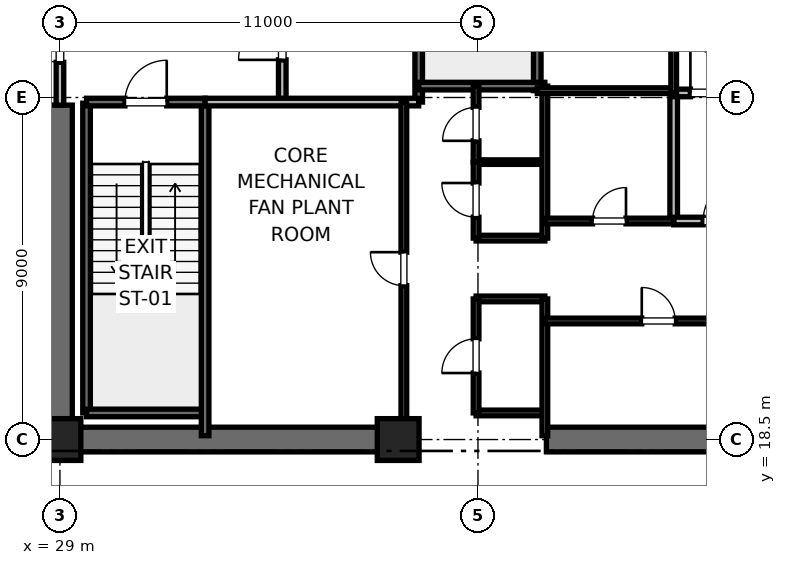
"""IFC4 building model, lengths in metres.
Left out: names, types, materials, properties, quantities, classifications, styles, units other than length and angle.
Written with IfcOpenShell. Run it as: python <this file> out.ifc"""

import sys

from ifc_helpers import new_model, si_unit, direction, frame, frame_2d, origin, origin_2d, place, context, subcontext, project, spatial, rectangle, extrude, element, fill, save


model = new_model("IFC4")
c1 = context("Model", 3, precision=1e-05, world=origin(), true_north=direction((0.0, 1.0)))
c2 = subcontext(c1, "Body", "Model", "MODEL_VIEW")
j1 = project(units=[si_unit("LENGTHUNIT", "METRE"), si_unit("PLANEANGLEUNIT", "RADIAN")], contexts=[c1])
p1 = place(None, origin())
s1 = spatial("IfcSite", under=j1, at=p1, CompositionType="ELEMENT")
p2 = place(p1, origin())
s2 = spatial("IfcBuilding", under=s1, at=p2, CompositionType="ELEMENT")
p3 = place(p2, frame((0.0, 0.0, -9.0)))
s3 = spatial("IfcBuildingStorey", under=s2, at=p3, CompositionType="ELEMENT", Elevation=-9.0)
for number, where, z_axis, x_axis in (
    (1, (29.0, 18.5, -0.3), (0.0, 0.0, 1.0), (1.0, 0.0, 0.0)),
    (2, (37.9, 18.5, -0.3), (0.0, 0.0, 1.0), (1.0, 0.0, 0.0)),
):
    element("IfcColumn", number, at=place(p3, frame(where, z_axis=z_axis, x_axis=x_axis)), inside=s3, PredefinedType="PILASTER", context=c2, shape_type="SweptSolid", body=[
        extrude(rectangle(XDim=1.1, YDim=1.1, at=origin_2d()), origin(), (0.0, 0.0, 1.0), 4.8),
    ])
for number, where, z_axis, x_axis in (
    (3, (29.0, 18.5, -0.3), (0.0, 0.0, 1.0), (1.0, 0.0, 0.0)),
    (4, (41.8, 18.5, -0.3), (0.0, 0.0, 1.0), (1.0, 0.0, 0.0)),
):
    element("IfcWall", number, at=place(p3, frame(where, z_axis=z_axis, x_axis=x_axis)), inside=s3, PredefinedType="SHEAR", context=c2, shape_type="SweptSolid", body=[
        extrude(rectangle(XDim=9.2, YDim=0.65, at=frame_2d((4.6, 0.0))), origin(), (0.0, 0.0, 1.0), 4.5),
    ])
p4 = place(p3, frame((29.0, 18.5, -0.3), z_axis=(0.0, 0.0, 1.0), x_axis=(0.0, 1.0, 0.0)))
e5 = element("IfcWall", 5, at=p4, inside=s3, PredefinedType="SHEAR", context=c2, shape_type="SweptSolid", body=[
    extrude(rectangle(XDim=8.8, YDim=0.65, at=frame_2d((4.4, 0.0))), origin(), (0.0, 0.0, 1.0), 4.5),
])
p5 = place(p3, frame((29.7, 19.2, -0.3), z_axis=(0.0, 0.0, 1.0), x_axis=(0.0, 1.0, 0.0)))
e6 = element("IfcWall", 6, at=p5, inside=s3, PredefinedType="SOLIDWALL", context=c2, shape_type="SweptSolid", body=[
    extrude(rectangle(XDim=8.15, YDim=0.2, at=frame_2d((4.075, 0.0))), origin(), (0.0, 0.0, 1.0), 4.5),
])
p6 = place(p3, frame((29.7, 19.2, -0.3), z_axis=(0.0, 0.0, 1.0), x_axis=(1.0, 0.0, 0.0)))
e7 = element("IfcWall", 7, at=p6, inside=s3, PredefinedType="SOLIDWALL", context=c2, shape_type="SweptSolid", body=[
    extrude(rectangle(XDim=3.12, YDim=0.2, at=frame_2d((1.56, 0.0))), origin(), (0.0, 0.0, 1.0), 4.5),
])
p7 = place(p3, frame((32.82, 18.6, -0.3), z_axis=(0.0, 0.0, 1.0), x_axis=(0.0, 1.0, 0.0)))
e8 = element("IfcWall", 8, at=p7, inside=s3, PredefinedType="SOLIDWALL", context=c2, shape_type="SweptSolid", body=[
    extrude(rectangle(XDim=8.78, YDim=0.2, at=frame_2d((4.39, 0.0))), origin(), (0.0, 0.0, 1.0), 4.5),
])
p8 = place(p3, frame((29.7, 27.38, -0.3), z_axis=(0.0, 0.0, 1.0), x_axis=(1.0, 0.0, 0.0)))
e9 = element("IfcWall", 9, at=p8, inside=s3, PredefinedType="SOLIDWALL", context=c2, shape_type="SweptSolid", body=[
    extrude(rectangle(XDim=3.12, YDim=0.2, at=frame_2d((1.56, 0.0))), origin(), (0.0, 0.0, 1.0), 4.5),
])
p9 = place(p8, frame((1.01, 0.0, 0.3)))
e10 = element("IfcOpeningElement", 10, at=p9, cuts=e9, PredefinedType="OPENING", context=c2, shape_type="SweptSolid", body=[
    extrude(rectangle(XDim=1.1, YDim=2.15, at=frame_2d((0.55, 1.075))), frame((0.0, 0.1, 0.0), z_axis=(0.0, -1.0, 0.0), x_axis=(1.0, 0.0, 0.0)), (0.0, 0.0, 1.0), 0.2),
])
p10 = place(p3, frame((38.44, 27.38, -0.3), z_axis=(0.0, 0.0, 1.0), x_axis=(0.0, 1.0, 0.0)))
e11 = element("IfcWall", 11, at=p10, inside=s3, PredefinedType="SOLIDWALL", context=c2, shape_type="SweptSolid", body=[
    extrude(rectangle(XDim=8.87, YDim=0.2, at=frame_2d((4.435, 0.0))), origin(), (0.0, 0.0, 1.0), 4.5),
])
p11 = place(p3, frame((41.56, 27.68, -0.3), z_axis=(0.0, 0.0, 1.0), x_axis=(0.0, 1.0, 0.0)))
e12 = element("IfcWall", 12, at=p11, inside=s3, PredefinedType="SOLIDWALL", context=c2, shape_type="SweptSolid", body=[
    extrude(rectangle(XDim=8.57, YDim=0.2, at=frame_2d((4.285, 0.0))), origin(), (0.0, 0.0, 1.0), 4.5),
])
p12 = place(p3, frame((38.44, 27.8, -0.3), z_axis=(0.0, 0.0, 1.0), x_axis=(1.0, 0.0, 0.0)))
e13 = element("IfcWall", 13, at=p12, inside=s3, PredefinedType="SOLIDWALL", context=c2, shape_type="SweptSolid", body=[
    extrude(rectangle(XDim=3.32, YDim=0.2, at=frame_2d((1.66, 0.0))), origin(), (0.0, 0.0, 1.0), 4.5),
])
p13 = place(p3, frame((34.85, 27.38, 0.0), z_axis=(0.0, 0.0, 1.0), x_axis=(0.0, 1.0, 0.0)))
e14 = element("IfcWall", 14, at=p13, inside=s3, PredefinedType="PARTITIONING", context=c2, shape_type="SweptSolid", body=[
    extrude(rectangle(XDim=3.37, YDim=0.2, at=frame_2d((1.685, 0.0))), origin(), (0.0, 0.0, 1.0), 4.2),
])
p14 = place(p13, frame((1.11, 0.0, 0.0)))
e15 = element("IfcOpeningElement", 15, at=p14, cuts=e14, PredefinedType="OPENING", context=c2, shape_type="SweptSolid", body=[
    extrude(rectangle(XDim=1.15, YDim=2.2, at=frame_2d((0.575, 1.1))), frame((0.0, 0.1, 0.0), z_axis=(0.0, -1.0, 0.0), x_axis=(1.0, 0.0, 0.0)), (0.0, 0.0, 1.0), 0.2),
])
p15 = place(p3, frame((29.0, 27.3, 0.0), z_axis=(0.0, 0.0, 1.0), x_axis=(0.0, 1.0, 0.0)))
e16 = element("IfcWall", 16, at=p15, inside=s3, PredefinedType="PARTITIONING", context=c2, shape_type="SweptSolid", body=[
    extrude(rectangle(XDim=3.4, YDim=0.2, at=frame_2d((1.7, 0.0))), origin(), (0.0, 0.0, 1.0), 2.98),
])
p16 = place(p15, frame((1.125, 0.0, 0.0)))
e17 = element("IfcOpeningElement", 17, at=p16, cuts=e16, PredefinedType="OPENING", context=c2, shape_type="SweptSolid", body=[
    extrude(rectangle(XDim=1.15, YDim=2.2, at=frame_2d((0.575, 1.1))), frame((0.0, 0.1, 0.0), z_axis=(0.0, -1.0, 0.0), x_axis=(1.0, 0.0, 0.0)), (0.0, 0.0, 1.0), 0.2),
])
p17 = place(p3, frame((32.82, 27.38, 0.0), z_axis=(0.0, 0.0, 1.0), x_axis=(1.0, 0.0, 0.0)))
e18 = element("IfcWall", 18, at=p17, inside=s3, PredefinedType="PARTITIONING", context=c2, shape_type="SweptSolid", body=[
    extrude(rectangle(XDim=5.62, YDim=0.2, at=frame_2d((2.81, 0.0))), origin(), (0.0, 0.0, 1.0), 4.2),
])
p18 = place(p3, frame((45.15, 24.25, 0.0), z_axis=(0.0, 0.0, 1.0), x_axis=(0.0, 1.0, 0.0)))
e19 = element("IfcWall", 19, at=p18, inside=s3, PredefinedType="PARTITIONING", context=c2, shape_type="SweptSolid", body=[
    extrude(rectangle(XDim=3.37, YDim=0.2, at=frame_2d((1.685, 0.0))), origin(), (0.0, 0.0, 1.0), 4.2),
])
p19 = place(p3, frame((45.15, 24.25, 0.0), z_axis=(0.0, 0.0, 1.0), x_axis=(1.0, 0.0, 0.0)))
e20 = element("IfcWall", 20, at=p19, inside=s3, PredefinedType="PARTITIONING", context=c2, shape_type="SweptSolid", body=[
    extrude(rectangle(XDim=2.7, YDim=0.2, at=frame_2d((1.35, 0.0))), origin(), (0.0, 0.0, 1.0), 4.2),
])
p20 = place(p19, frame((0.775, 0.0, 0.0)))
e21 = element("IfcOpeningElement", 21, at=p20, cuts=e20, PredefinedType="OPENING", context=c2, shape_type="SweptSolid", body=[
    extrude(rectangle(XDim=1.15, YDim=2.2, at=frame_2d((0.575, 1.1))), frame((0.0, 0.1, 0.0), z_axis=(0.0, -1.0, 0.0), x_axis=(1.0, 0.0, 0.0)), (0.0, 0.0, 1.0), 0.2),
])
p21 = place(p3, frame((45.15, 27.62, 0.0), z_axis=(0.0, 0.0, 1.0), x_axis=(1.0, 0.0, 0.0)))
e22 = element("IfcWall", 22, at=p21, inside=s3, PredefinedType="PARTITIONING", context=c2, shape_type="SweptSolid", body=[
    extrude(rectangle(XDim=2.03, YDim=0.2, at=frame_2d((1.015, 0.0))), origin(), (0.0, 0.0, 1.0), 4.2),
])
p22 = place(p21, frame((0.44, 0.0, 0.0)))
e23 = element("IfcOpeningElement", 23, at=p22, cuts=e22, PredefinedType="OPENING", context=c2, shape_type="SweptSolid", body=[
    extrude(rectangle(XDim=1.15, YDim=2.2, at=frame_2d((0.575, 1.1))), frame((0.0, 0.1, 0.0), z_axis=(0.0, -1.0, 0.0), x_axis=(1.0, 0.0, 0.0)), (0.0, 0.0, 1.0), 0.2),
])
for number, where, z_axis, x_axis in (
    (24, (39.95, 19.2, 0.0), (0.0, 0.0, 1.0), (1.0, 0.0, 0.0)),
    (25, (39.95, 22.2, 0.0), (0.0, 0.0, 1.0), (1.0, 0.0, 0.0)),
    (26, (39.95, 23.8, 0.0), (0.0, 0.0, 1.0), (1.0, 0.0, 0.0)),
):
    element("IfcWall", number, at=place(p3, frame(where, z_axis=z_axis, x_axis=x_axis)), inside=s3, PredefinedType="PARTITIONING", context=c2, shape_type="SweptSolid", body=[
        extrude(rectangle(XDim=1.81, YDim=0.15, at=frame_2d((0.905, 0.0))), origin(), (0.0, 0.0, 1.0), 2.85),
    ])
p23 = place(p3, frame((39.95, 25.8, 0.0), z_axis=(0.0, 0.0, 1.0), x_axis=(1.0, 0.0, 0.0)))
e27 = element("IfcWall", 27, at=p23, inside=s3, PredefinedType="PARTITIONING", context=c2, shape_type="SweptSolid", body=[
    extrude(rectangle(XDim=1.81, YDim=0.12, at=frame_2d((0.905, 0.0))), origin(), (0.0, 0.0, 1.0), 2.85),
])
p24 = place(p3, frame((41.76, 18.6, 0.0), z_axis=(0.0, 0.0, 1.0), x_axis=(0.0, 1.0, 0.0)))
e28 = element("IfcWall", 28, at=p24, inside=s3, PredefinedType="PARTITIONING", context=c2, shape_type="SweptSolid", body=[
    extrude(rectangle(XDim=3.6, YDim=0.15, at=frame_2d((1.8, 0.0))), origin(), (0.0, 0.0, 1.0), 2.85),
])
p25 = place(p3, frame((41.76, 23.8, 0.0), z_axis=(0.0, 0.0, 1.0), x_axis=(0.0, 1.0, 0.0)))
e29 = element("IfcWall", 29, at=p25, inside=s3, PredefinedType="PARTITIONING", context=c2, shape_type="SweptSolid", body=[
    extrude(rectangle(XDim=4.0, YDim=0.15, at=frame_2d((2.0, 0.0))), origin(), (0.0, 0.0, 1.0), 2.85),
])
p26 = place(p3, frame((39.95, 19.2, 0.0), z_axis=(0.0, 0.0, 1.0), x_axis=(0.0, 1.0, 0.0)))
e30 = element("IfcWall", 30, at=p26, inside=s3, PredefinedType="PARTITIONING", context=c2, shape_type="SweptSolid", body=[
    extrude(rectangle(XDim=3.0, YDim=0.15, at=frame_2d((1.5, 0.0))), origin(), (0.0, 0.0, 1.0), 2.85),
])
p27 = place(p26, frame((1.05, 0.0, 0.0)))
e31 = element("IfcOpeningElement", 31, at=p27, cuts=e30, PredefinedType="OPENING", context=c2, shape_type="SweptSolid", body=[
    extrude(rectangle(XDim=0.9, YDim=2.1, at=frame_2d((0.45, 1.05))), frame((0.0, 0.075, 0.0), z_axis=(0.0, -1.0, 0.0), x_axis=(1.0, 0.0, 0.0)), (0.0, 0.0, 1.0), 0.15),
])
p28 = place(p3, frame((39.95, 23.8, 0.0), z_axis=(0.0, 0.0, 1.0), x_axis=(0.0, 1.0, 0.0)))
e32 = element("IfcWall", 32, at=p28, inside=s3, PredefinedType="PARTITIONING", context=c2, shape_type="SweptSolid", body=[
    extrude(rectangle(XDim=2.0, YDim=0.15, at=frame_2d((1.0, 0.0))), origin(), (0.0, 0.0, 1.0), 2.85),
])
p29 = place(p28, frame((0.55, 0.0, 0.0)))
e33 = element("IfcOpeningElement", 33, at=p29, cuts=e32, PredefinedType="OPENING", context=c2, shape_type="SweptSolid", body=[
    extrude(rectangle(XDim=0.9, YDim=2.1, at=frame_2d((0.45, 1.05))), frame((0.0, 0.075, 0.0), z_axis=(0.0, -1.0, 0.0), x_axis=(1.0, 0.0, 0.0)), (0.0, 0.0, 1.0), 0.15),
])
p30 = place(p3, frame((39.95, 25.8, 0.0), z_axis=(0.0, 0.0, 1.0), x_axis=(0.0, 1.0, 0.0)))
e34 = element("IfcWall", 34, at=p30, inside=s3, PredefinedType="PARTITIONING", context=c2, shape_type="SweptSolid", body=[
    extrude(rectangle(XDim=2.0, YDim=0.15, at=frame_2d((1.0, 0.0))), origin(), (0.0, 0.0, 1.0), 2.85),
])
p31 = place(p30, frame((0.56, 0.0, 0.0)))
e35 = element("IfcOpeningElement", 35, at=p31, cuts=e34, PredefinedType="OPENING", context=c2, shape_type="SweptSolid", body=[
    extrude(rectangle(XDim=0.88, YDim=2.1, at=frame_2d((0.44, 1.05))), frame((0.0, 0.075, 0.0), z_axis=(0.0, -1.0, 0.0), x_axis=(1.0, 0.0, 0.0)), (0.0, 0.0, 1.0), 0.15),
])
p32 = place(p3, frame((38.05, 18.6, 0.0), z_axis=(0.0, 0.0, 1.0), x_axis=(0.0, 1.0, 0.0)))
e36 = element("IfcWall", 36, at=p32, inside=s3, PredefinedType="PARTITIONING", context=c2, shape_type="SweptSolid", body=[
    extrude(rectangle(XDim=8.78, YDim=0.15, at=frame_2d((4.39, 0.0))), origin(), (0.0, 0.0, 1.0), 2.85),
])
p33 = place(p32, frame((3.95, 0.0, 0.0)))
e37 = element("IfcOpeningElement", 37, at=p33, cuts=e36, PredefinedType="OPENING", context=c2, shape_type="SweptSolid", body=[
    extrude(rectangle(XDim=0.88, YDim=2.1, at=frame_2d((0.44, 1.05))), frame((0.0, 0.075, 0.0), z_axis=(0.0, -1.0, 0.0), x_axis=(1.0, 0.0, 0.0)), (0.0, 0.0, 1.0), 0.15),
])
p34 = place(p3, frame((41.56, 27.68, 0.0), z_axis=(0.0, 0.0, 1.0), x_axis=(1.0, 0.0, 0.0)))
e38 = element("IfcWall", 38, at=p34, inside=s3, PredefinedType="PARTITIONING", context=c2, shape_type="SweptSolid", body=[
    extrude(rectangle(XDim=3.59, YDim=0.15, at=frame_2d((1.795, 0.0))), origin(), (0.0, 0.0, 1.0), 2.85),
])
p35 = place(p3, frame((41.76, 21.62, 0.0), z_axis=(0.0, 0.0, 1.0), x_axis=(1.0, 0.0, 0.0)))
e39 = element("IfcWall", 39, at=p35, inside=s3, PredefinedType="PARTITIONING", context=c2, shape_type="SweptSolid", body=[
    extrude(rectangle(XDim=5.98, YDim=0.15, at=frame_2d((2.99, 0.0))), origin(), (0.0, 0.0, 1.0), 2.85),
])
p36 = place(p35, frame((2.55, 0.0, 0.0)))
e40 = element("IfcOpeningElement", 40, at=p36, cuts=e39, PredefinedType="OPENING", context=c2, shape_type="SweptSolid", body=[
    extrude(rectangle(XDim=0.88, YDim=2.1, at=frame_2d((0.44, 1.05))), frame((0.0, 0.075, 0.0), z_axis=(0.0, -1.0, 0.0), x_axis=(1.0, 0.0, 0.0)), (0.0, 0.0, 1.0), 0.15),
])
p37 = place(p3, frame((41.76, 24.25, 0.0), z_axis=(0.0, 0.0, 1.0), x_axis=(1.0, 0.0, 0.0)))
e41 = element("IfcWall", 41, at=p37, inside=s3, PredefinedType="PARTITIONING", context=c2, shape_type="SweptSolid", body=[
    extrude(rectangle(XDim=3.39, YDim=0.15, at=frame_2d((1.695, 0.0))), origin(), (0.0, 0.0, 1.0), 2.85),
])
p38 = place(p37, frame((1.255, 0.0, 0.0)))
e42 = element("IfcOpeningElement", 42, at=p38, cuts=e41, PredefinedType="OPENING", context=c2, shape_type="SweptSolid", body=[
    extrude(rectangle(XDim=0.88, YDim=2.1, at=frame_2d((0.44, 1.05))), frame((0.0, 0.075, 0.0), z_axis=(0.0, -1.0, 0.0), x_axis=(1.0, 0.0, 0.0)), (0.0, 0.0, 1.0), 0.15),
])
p39 = place(p3, frame((45.15, 27.62, 0.0), z_axis=(0.0, 0.0, 1.0), x_axis=(0.0, 1.0, 0.0)))
e43 = element("IfcWall", 43, at=p39, inside=s3, PredefinedType="PARTITIONING", context=c2, shape_type="SweptSolid", body=[
    extrude(rectangle(XDim=3.1, YDim=0.15, at=frame_2d((1.55, 0.0))), origin(), (0.0, 0.0, 1.0), 2.85),
])
p40 = place(p9, origin())
e44 = element("IfcDoor", 44, at=p40, inside=s3, OperationType="SINGLE_SWING_RIGHT", PredefinedType="DOOR", context=c2, shape_type="SweptSolid", body=[
    extrude(rectangle(XDim=1.1, YDim=2.15, at=frame_2d((0.55, 1.075))), frame((0.0, 0.025, 0.0), z_axis=(0.0, -1.0, 0.0), x_axis=(1.0, 0.0, 0.0)), (0.0, 0.0, 1.0), 0.05),
])
fill(e10, e44)
p41 = place(p14, origin())
e45 = element("IfcDoor", 45, at=p41, inside=s3, OperationType="SINGLE_SWING_LEFT", PredefinedType="DOOR", context=c2, shape_type="SweptSolid", body=[
    extrude(rectangle(XDim=1.15, YDim=2.2, at=frame_2d((0.575, 1.1))), frame((0.0, 0.025, 0.0), z_axis=(0.0, -1.0, 0.0), x_axis=(1.0, 0.0, 0.0)), (0.0, 0.0, 1.0), 0.05),
])
fill(e15, e45)
p42 = place(p16, origin())
e46 = element("IfcDoor", 46, at=p42, inside=s3, OperationType="SINGLE_SWING_RIGHT", PredefinedType="DOOR", context=c2, shape_type="SweptSolid", body=[
    extrude(rectangle(XDim=1.15, YDim=2.2, at=frame_2d((0.575, 1.1))), frame((0.0, 0.025, 0.0), z_axis=(0.0, -1.0, 0.0), x_axis=(1.0, 0.0, 0.0)), (0.0, 0.0, 1.0), 0.05),
])
fill(e17, e46)
p43 = place(p20, origin())
e47 = element("IfcDoor", 47, at=p43, inside=s3, OperationType="SINGLE_SWING_RIGHT", PredefinedType="DOOR", context=c2, shape_type="SweptSolid", body=[
    extrude(rectangle(XDim=1.15, YDim=2.2, at=frame_2d((0.575, 1.1))), frame((0.0, 0.025, 0.0), z_axis=(0.0, -1.0, 0.0), x_axis=(1.0, 0.0, 0.0)), (0.0, 0.0, 1.0), 0.05),
])
fill(e21, e47)
p44 = place(p22, origin())
e48 = element("IfcDoor", 48, at=p44, inside=s3, OperationType="SINGLE_SWING_LEFT", PredefinedType="DOOR", context=c2, shape_type="SweptSolid", body=[
    extrude(rectangle(XDim=1.15, YDim=2.2, at=frame_2d((0.575, 1.1))), frame((0.0, 0.025, 0.0), z_axis=(0.0, -1.0, 0.0), x_axis=(1.0, 0.0, 0.0)), (0.0, 0.0, 1.0), 0.05),
])
fill(e23, e48)
p45 = place(p27, origin())
e49 = element("IfcDoor", 49, at=p45, inside=s3, OperationType="SINGLE_SWING_LEFT", PredefinedType="DOOR", context=c2, shape_type="SweptSolid", body=[
    extrude(rectangle(XDim=0.9, YDim=2.1, at=frame_2d((0.45, 1.05))), frame((0.0, 0.025, 0.0), z_axis=(0.0, -1.0, 0.0), x_axis=(1.0, 0.0, 0.0)), (0.0, 0.0, 1.0), 0.05),
])
fill(e31, e49)
p46 = place(p29, origin())
e50 = element("IfcDoor", 50, at=p46, inside=s3, OperationType="SINGLE_SWING_RIGHT", PredefinedType="DOOR", context=c2, shape_type="SweptSolid", body=[
    extrude(rectangle(XDim=0.9, YDim=2.1, at=frame_2d((0.45, 1.05))), frame((0.0, 0.025, 0.0), z_axis=(0.0, -1.0, 0.0), x_axis=(1.0, 0.0, 0.0)), (0.0, 0.0, 1.0), 0.05),
])
fill(e33, e50)
p47 = place(p31, origin())
e51 = element("IfcDoor", 51, at=p47, inside=s3, OperationType="SINGLE_SWING_LEFT", PredefinedType="DOOR", context=c2, shape_type="SweptSolid", body=[
    extrude(rectangle(XDim=0.88, YDim=2.1, at=frame_2d((0.44, 1.05))), frame((0.0, 0.025, 0.0), z_axis=(0.0, -1.0, 0.0), x_axis=(1.0, 0.0, 0.0)), (0.0, 0.0, 1.0), 0.05),
])
fill(e35, e51)
p48 = place(p33, origin())
e52 = element("IfcDoor", 52, at=p48, inside=s3, OperationType="SINGLE_SWING_RIGHT", PredefinedType="DOOR", context=c2, shape_type="SweptSolid", body=[
    extrude(rectangle(XDim=0.88, YDim=2.1, at=frame_2d((0.44, 1.05))), frame((0.0, 0.025, 0.0), z_axis=(0.0, -1.0, 0.0), x_axis=(1.0, 0.0, 0.0)), (0.0, 0.0, 1.0), 0.05),
])
fill(e37, e52)
p49 = place(p36, origin())
e53 = element("IfcDoor", 53, at=p49, inside=s3, OperationType="SINGLE_SWING_LEFT", PredefinedType="DOOR", context=c2, shape_type="SweptSolid", body=[
    extrude(rectangle(XDim=0.88, YDim=2.1, at=frame_2d((0.44, 1.05))), frame((0.0, 0.025, 0.0), z_axis=(0.0, -1.0, 0.0), x_axis=(1.0, 0.0, 0.0)), (0.0, 0.0, 1.0), 0.05),
])
fill(e40, e53)
p50 = place(p38, origin())
e54 = element("IfcDoor", 54, at=p50, inside=s3, OperationType="SINGLE_SWING_RIGHT", PredefinedType="DOOR", context=c2, shape_type="SweptSolid", body=[
    extrude(rectangle(XDim=0.88, YDim=2.1, at=frame_2d((0.44, 1.05))), frame((0.0, 0.025, 0.0), z_axis=(0.0, -1.0, 0.0), x_axis=(1.0, 0.0, 0.0)), (0.0, 0.0, 1.0), 0.05),
])
fill(e42, e54)
save(model, sys.argv[1])
